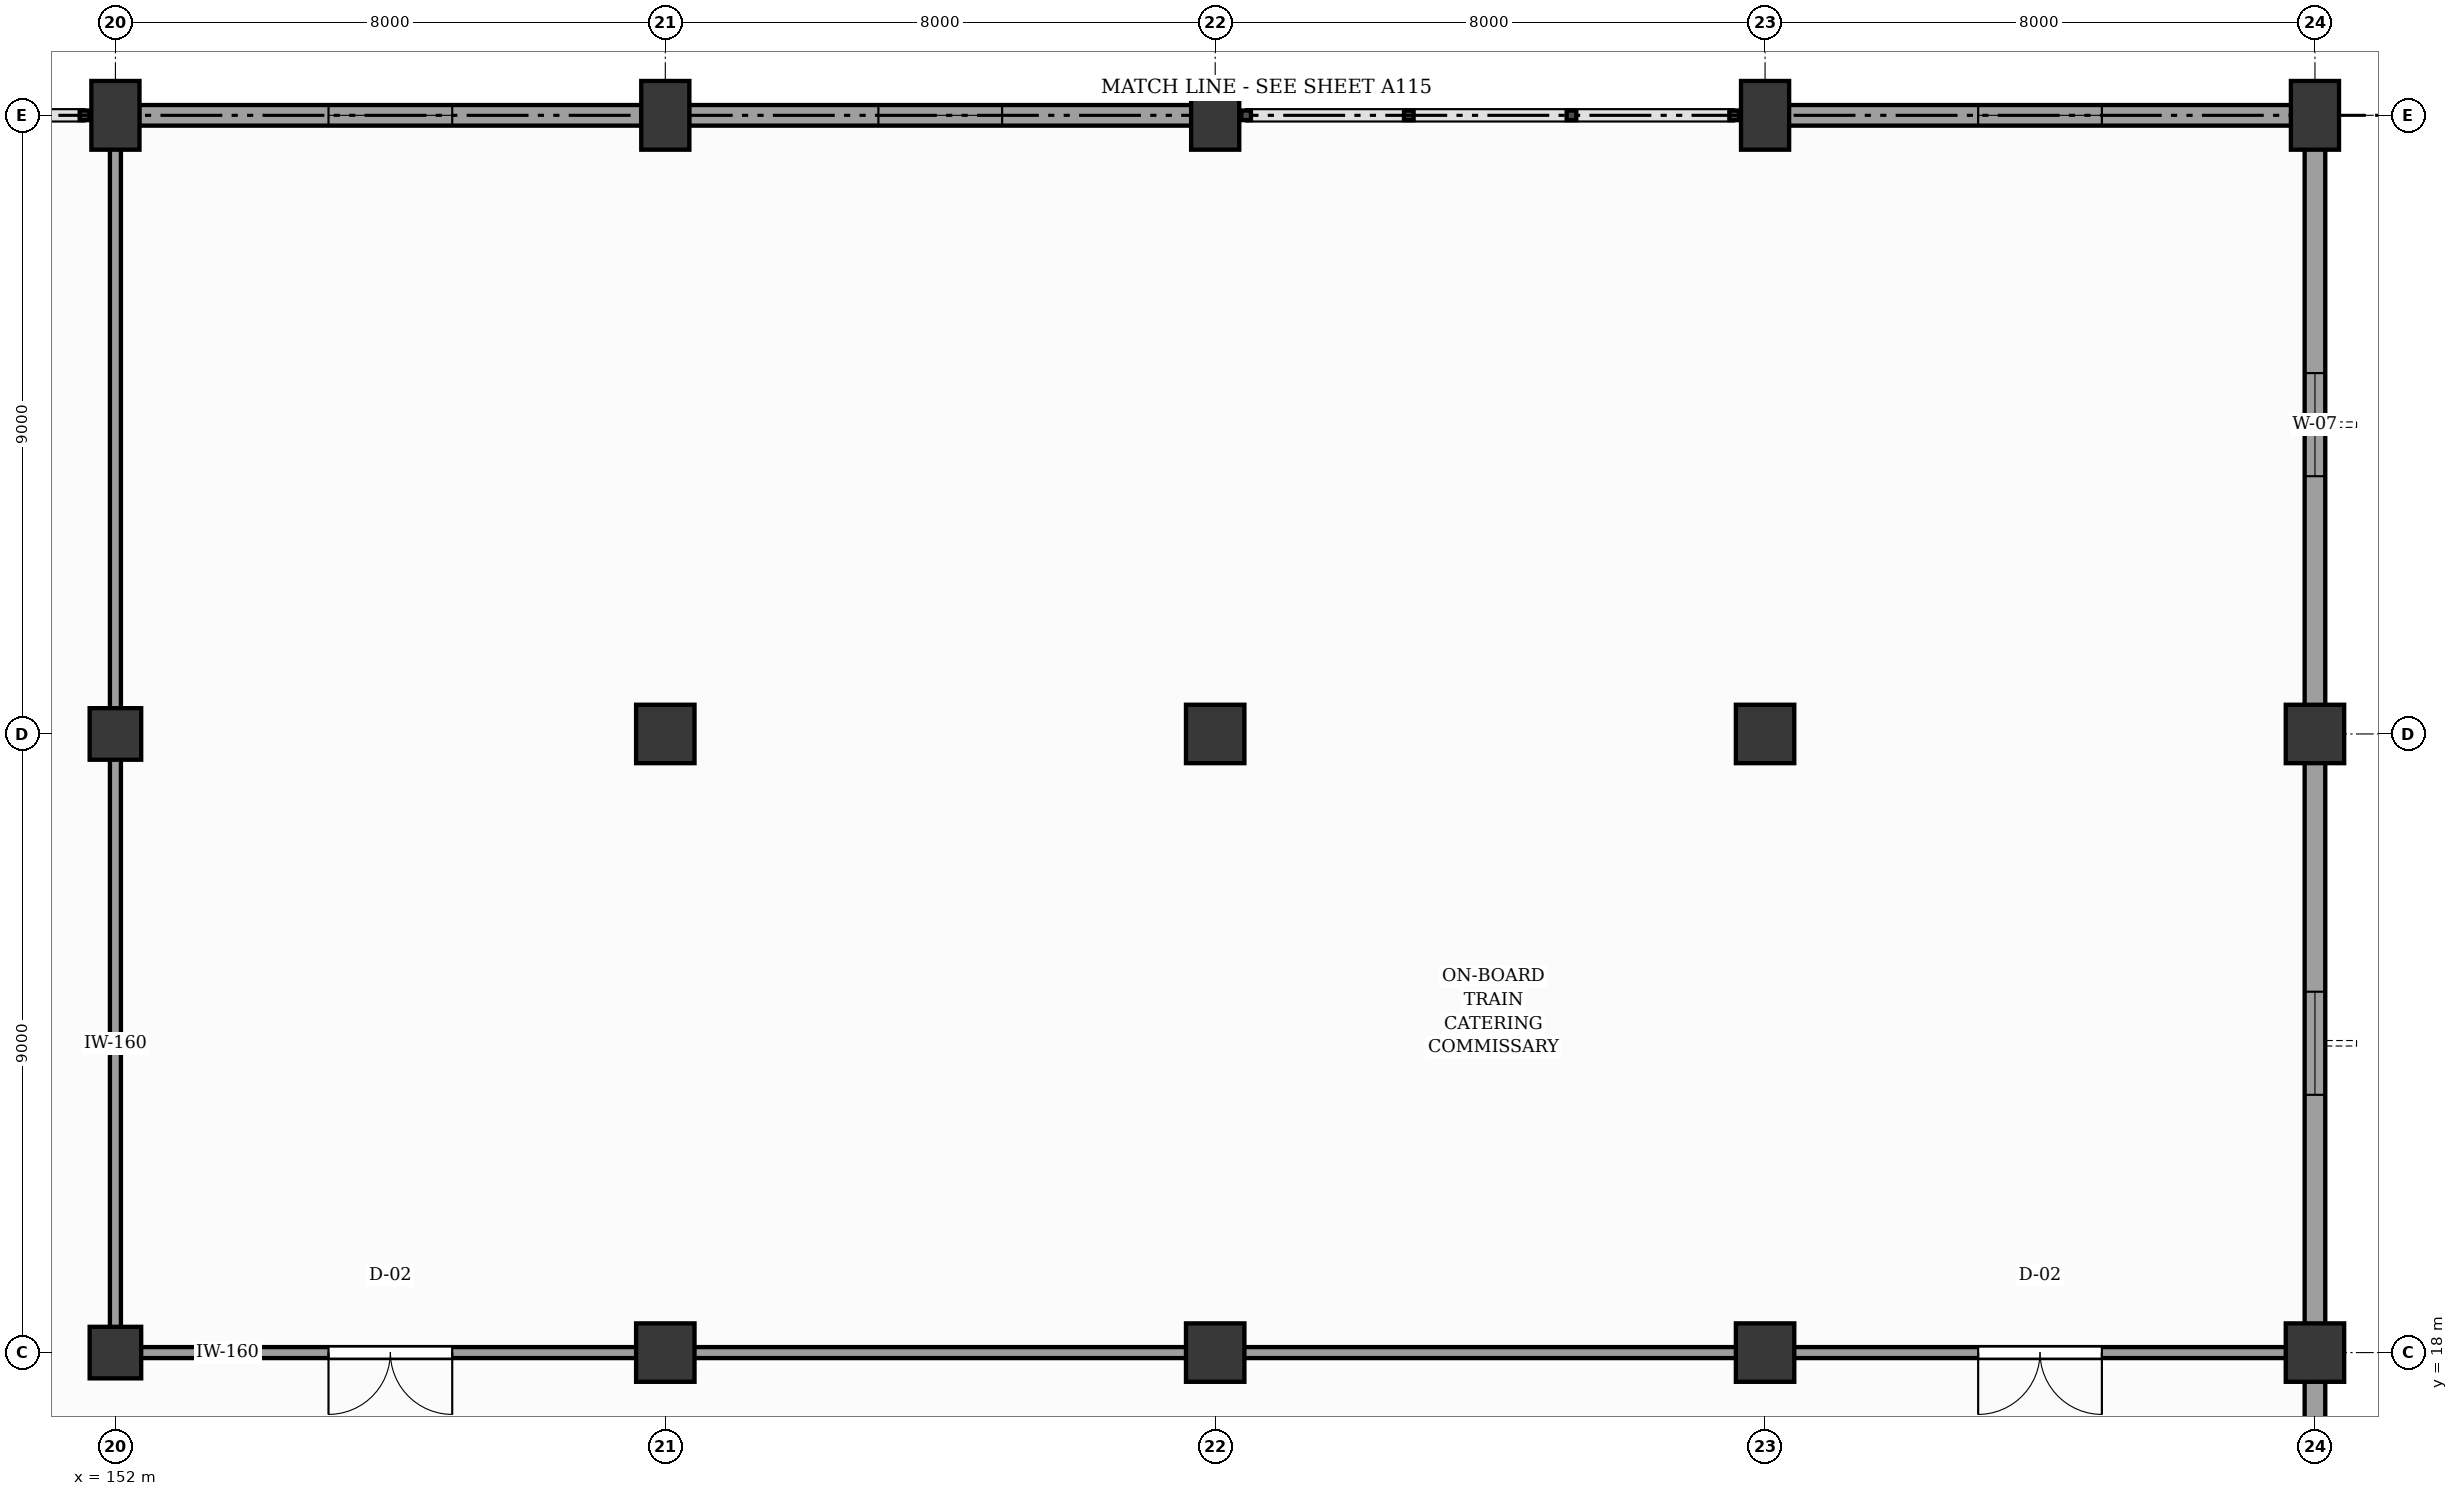
"""IFC4 building model, lengths in metres.
Left out: names, types, materials, properties, quantities, classifications, styles, units other than length and angle.
Written with IfcOpenShell. Run it as: python <this file> out.ifc"""

import sys

from ifc_helpers import new_model, si_unit, direction, frame, frame_2d, origin, origin_2d, place, context, subcontext, project, spatial, rectangle, extrude, element, fill, save


model = new_model("IFC4")
c1 = context("Model", 3, precision=1e-05, world=origin(), true_north=direction((0.0, 1.0)))
c2 = subcontext(c1, "Body", "Model", "MODEL_VIEW")
j1 = project(units=[si_unit("LENGTHUNIT", "METRE"), si_unit("PLANEANGLEUNIT", "RADIAN")], contexts=[c1])
p1 = place(None, origin())
s1 = spatial("IfcSite", under=j1, at=p1, CompositionType="ELEMENT")
p2 = place(p1, origin())
s2 = spatial("IfcBuilding", under=s1, at=p2, CompositionType="ELEMENT")
p3 = place(p2, frame((0.0, 0.0, 4.8)))
s3 = spatial("IfcBuildingStorey", under=s2, at=p3, CompositionType="ELEMENT", Elevation=4.8)
for number, where, z_axis, x_axis in (
    (1, (152.0, 18.0, 0.0), (0.0, 0.0, 1.0), (1.0, 0.0, 0.0)),
    (2, (152.0, 27.0, 0.0), (0.0, 0.0, 1.0), (1.0, 0.0, 0.0)),
):
    element("IfcColumn", number, at=place(p3, frame(where, z_axis=z_axis, x_axis=x_axis)), inside=s3, PredefinedType="COLUMN", context=c2, shape_type="SweptSolid", body=[
        extrude(rectangle(XDim=0.75, YDim=0.75, at=origin_2d()), origin(), (0.0, 0.0, 1.0), 4.8),
    ])
p4 = place(p3, frame((152.0, 36.0, 0.0), z_axis=(0.0, 0.0, 1.0), x_axis=(1.0, 0.0, 0.0)))
e3 = element("IfcColumn", 3, at=p4, inside=s3, PredefinedType="COLUMN", context=c2, shape_type="SweptSolid", body=[
    extrude(rectangle(XDim=0.7, YDim=1.0, at=origin_2d()), origin(), (0.0, 0.0, 1.0), 4.8),
])
for number, where, z_axis, x_axis in (
    (4, (160.0, 18.0, 0.0), (0.0, 0.0, 1.0), (1.0, 0.0, 0.0)),
    (5, (160.0, 27.0, 0.0), (0.0, 0.0, 1.0), (1.0, 0.0, 0.0)),
):
    element("IfcColumn", number, at=place(p3, frame(where, z_axis=z_axis, x_axis=x_axis)), inside=s3, PredefinedType="COLUMN", context=c2, shape_type="SweptSolid", body=[
        extrude(rectangle(XDim=0.85, YDim=0.85, at=origin_2d()), origin(), (0.0, 0.0, 1.0), 4.8),
    ])
p5 = place(p3, frame((160.0, 36.0, 0.0), z_axis=(0.0, 0.0, 1.0), x_axis=(1.0, 0.0, 0.0)))
e6 = element("IfcColumn", 6, at=p5, inside=s3, PredefinedType="COLUMN", context=c2, shape_type="SweptSolid", body=[
    extrude(rectangle(XDim=0.7, YDim=1.0, at=origin_2d()), origin(), (0.0, 0.0, 1.0), 4.8),
])
for number, where, z_axis, x_axis in (
    (7, (168.0, 18.0, 0.0), (0.0, 0.0, 1.0), (1.0, 0.0, 0.0)),
    (8, (168.0, 27.0, 0.0), (0.0, 0.0, 1.0), (1.0, 0.0, 0.0)),
):
    element("IfcColumn", number, at=place(p3, frame(where, z_axis=z_axis, x_axis=x_axis)), inside=s3, PredefinedType="COLUMN", context=c2, shape_type="SweptSolid", body=[
        extrude(rectangle(XDim=0.85, YDim=0.85, at=origin_2d()), origin(), (0.0, 0.0, 1.0), 4.8),
    ])
p6 = place(p3, frame((168.0, 36.0, 0.0), z_axis=(0.0, 0.0, 1.0), x_axis=(1.0, 0.0, 0.0)))
e9 = element("IfcColumn", 9, at=p6, inside=s3, PredefinedType="COLUMN", context=c2, shape_type="SweptSolid", body=[
    extrude(rectangle(XDim=0.7, YDim=1.0, at=origin_2d()), origin(), (0.0, 0.0, 1.0), 4.8),
])
for number, where, z_axis, x_axis in (
    (10, (176.0, 18.0, 0.0), (0.0, 0.0, 1.0), (1.0, 0.0, 0.0)),
    (11, (176.0, 27.0, 0.0), (0.0, 0.0, 1.0), (1.0, 0.0, 0.0)),
):
    element("IfcColumn", number, at=place(p3, frame(where, z_axis=z_axis, x_axis=x_axis)), inside=s3, PredefinedType="COLUMN", context=c2, shape_type="SweptSolid", body=[
        extrude(rectangle(XDim=0.85, YDim=0.85, at=origin_2d()), origin(), (0.0, 0.0, 1.0), 4.8),
    ])
p7 = place(p3, frame((176.0, 36.0, 0.0), z_axis=(0.0, 0.0, 1.0), x_axis=(1.0, 0.0, 0.0)))
e12 = element("IfcColumn", 12, at=p7, inside=s3, PredefinedType="COLUMN", context=c2, shape_type="SweptSolid", body=[
    extrude(rectangle(XDim=0.7, YDim=1.0, at=origin_2d()), origin(), (0.0, 0.0, 1.0), 4.8),
])
for number, where, z_axis, x_axis in (
    (13, (184.0, 18.0, 0.0), (0.0, 0.0, 1.0), (1.0, 0.0, 0.0)),
    (14, (184.0, 27.0, 0.0), (0.0, 0.0, 1.0), (1.0, 0.0, 0.0)),
):
    element("IfcColumn", number, at=place(p3, frame(where, z_axis=z_axis, x_axis=x_axis)), inside=s3, PredefinedType="COLUMN", context=c2, shape_type="SweptSolid", body=[
        extrude(rectangle(XDim=0.85, YDim=0.85, at=origin_2d()), origin(), (0.0, 0.0, 1.0), 4.8),
    ])
p8 = place(p3, frame((184.0, 36.0, 0.0), z_axis=(0.0, 0.0, 1.0), x_axis=(1.0, 0.0, 0.0)))
e15 = element("IfcColumn", 15, at=p8, inside=s3, PredefinedType="COLUMN", context=c2, shape_type="SweptSolid", body=[
    extrude(rectangle(XDim=0.7, YDim=1.0, at=origin_2d()), origin(), (0.0, 0.0, 1.0), 4.8),
])
p9 = place(p3, frame((152.345, 36.0, 0.0), z_axis=(0.0, 0.0, 1.0), x_axis=(1.0, 0.0, 0.0)))
e16 = element("IfcWall", 16, at=p9, inside=s3, PredefinedType="SOLIDWALL", context=c2, shape_type="SweptSolid", body=[
    extrude(rectangle(XDim=7.31, YDim=0.3, at=frame_2d((3.655, 0.0))), origin(), (0.0, 0.0, 1.0), 3.31),
])
p10 = place(p9, frame((2.755, 0.0, 0.95)))
e17 = element("IfcOpeningElement", 17, at=p10, cuts=e16, PredefinedType="OPENING", context=c2, shape_type="SweptSolid", body=[
    extrude(rectangle(XDim=1.8, YDim=2.22, at=frame_2d((0.9, 1.11))), frame((0.0, 0.16, 0.0), z_axis=(0.0, -1.0, 0.0), x_axis=(1.0, 0.0, 0.0)), (0.0, 0.0, 1.0), 0.32),
])
p11 = place(p3, frame((160.345, 36.0, 0.0), z_axis=(0.0, 0.0, 1.0), x_axis=(1.0, 0.0, 0.0)))
e18 = element("IfcWall", 18, at=p11, inside=s3, PredefinedType="SOLIDWALL", context=c2, shape_type="SweptSolid", body=[
    extrude(rectangle(XDim=7.31, YDim=0.3, at=frame_2d((3.655, 0.0))), origin(), (0.0, 0.0, 1.0), 3.31),
])
p12 = place(p11, frame((2.755, 0.0, 0.95)))
e19 = element("IfcOpeningElement", 19, at=p12, cuts=e18, PredefinedType="OPENING", context=c2, shape_type="SweptSolid", body=[
    extrude(rectangle(XDim=1.8, YDim=2.22, at=frame_2d((0.9, 1.11))), frame((0.0, 0.16, 0.0), z_axis=(0.0, -1.0, 0.0), x_axis=(1.0, 0.0, 0.0)), (0.0, 0.0, 1.0), 0.32),
])
p13 = place(p3, frame((176.345, 36.0, 0.0), z_axis=(0.0, 0.0, 1.0), x_axis=(1.0, 0.0, 0.0)))
e20 = element("IfcWall", 20, at=p13, inside=s3, PredefinedType="SOLIDWALL", context=c2, shape_type="SweptSolid", body=[
    extrude(rectangle(XDim=7.31, YDim=0.3, at=frame_2d((3.655, 0.0))), origin(), (0.0, 0.0, 1.0), 3.31),
])
p14 = place(p13, frame((2.755, 0.0, 0.95)))
e21 = element("IfcOpeningElement", 21, at=p14, cuts=e20, PredefinedType="OPENING", context=c2, shape_type="SweptSolid", body=[
    extrude(rectangle(XDim=1.8, YDim=2.22, at=frame_2d((0.9, 1.11))), frame((0.0, 0.16, 0.0), z_axis=(0.0, -1.0, 0.0), x_axis=(1.0, 0.0, 0.0)), (0.0, 0.0, 1.0), 0.32),
])
p15 = place(p3, frame((184.0, 9.4, 0.0), z_axis=(0.0, 0.0, 1.0), x_axis=(0.0, 1.0, 0.0)))
e22 = element("IfcWall", 22, at=p15, inside=s3, PredefinedType="SOLIDWALL", context=c2, shape_type="SweptSolid", body=[
    extrude(rectangle(XDim=8.2, YDim=0.3, at=frame_2d((4.1, 0.0))), origin(), (0.0, 0.0, 1.0), 3.66),
])
p16 = place(p15, frame((3.35, 0.0, 0.95)))
e23 = element("IfcOpeningElement", 23, at=p16, cuts=e22, PredefinedType="OPENING", context=c2, shape_type="SweptSolid", body=[
    extrude(rectangle(XDim=1.5, YDim=1.9, at=frame_2d((0.75, 0.95))), frame((0.0, 0.16, 0.0), z_axis=(0.0, -1.0, 0.0), x_axis=(1.0, 0.0, 0.0)), (0.0, 0.0, 1.0), 0.32),
])
p17 = place(p3, frame((184.0, 18.4, 0.0), z_axis=(0.0, 0.0, 1.0), x_axis=(0.0, 1.0, 0.0)))
e24 = element("IfcWall", 24, at=p17, inside=s3, PredefinedType="SOLIDWALL", context=c2, shape_type="SweptSolid", body=[
    extrude(rectangle(XDim=8.2, YDim=0.3, at=frame_2d((4.1, 0.0))), origin(), (0.0, 0.0, 1.0), 3.66),
])
p18 = place(p17, frame((3.35, 0.0, 0.95)))
e25 = element("IfcOpeningElement", 25, at=p18, cuts=e24, PredefinedType="OPENING", context=c2, shape_type="SweptSolid", body=[
    extrude(rectangle(XDim=1.5, YDim=1.9, at=frame_2d((0.75, 0.95))), frame((0.0, 0.16, 0.0), z_axis=(0.0, -1.0, 0.0), x_axis=(1.0, 0.0, 0.0)), (0.0, 0.0, 1.0), 0.32),
])
p19 = place(p3, frame((184.0, 27.4, 0.0), z_axis=(0.0, 0.0, 1.0), x_axis=(0.0, 1.0, 0.0)))
e26 = element("IfcWall", 26, at=p19, inside=s3, PredefinedType="SOLIDWALL", context=c2, shape_type="SweptSolid", body=[
    extrude(rectangle(XDim=8.2, YDim=0.3, at=frame_2d((4.1, 0.0))), origin(), (0.0, 0.0, 1.0), 3.31),
])
p20 = place(p19, frame((3.35, 0.0, 0.95)))
e27 = element("IfcOpeningElement", 27, at=p20, cuts=e26, PredefinedType="OPENING", context=c2, shape_type="SweptSolid", body=[
    extrude(rectangle(XDim=1.5, YDim=1.9, at=frame_2d((0.75, 0.95))), frame((0.0, 0.16, 0.0), z_axis=(0.0, -1.0, 0.0), x_axis=(1.0, 0.0, 0.0)), (0.0, 0.0, 1.0), 0.32),
])
p21 = place(p3, frame((152.3, 18.0, 0.0), z_axis=(0.0, 0.0, 1.0), x_axis=(1.0, 0.0, 0.0)))
e28 = element("IfcWall", 28, at=p21, inside=s3, PredefinedType="PARTITIONING", context=c2, shape_type="SweptSolid", body=[
    extrude(rectangle(XDim=7.4, YDim=0.16, at=frame_2d((3.7, 0.0))), origin(), (0.0, 0.0, 1.0), 3.66),
])
p22 = place(p21, frame((2.8, 0.0, 0.0)))
e29 = element("IfcOpeningElement", 29, at=p22, cuts=e28, PredefinedType="OPENING", context=c2, shape_type="SweptSolid", body=[
    extrude(rectangle(XDim=1.8, YDim=2.25, at=frame_2d((0.9, 1.125))), frame((0.0, 0.09, 0.0), z_axis=(0.0, -1.0, 0.0), x_axis=(1.0, 0.0, 0.0)), (0.0, 0.0, 1.0), 0.18),
])
for number, where, z_axis, x_axis in (
    (30, (160.3, 18.0, 0.0), (0.0, 0.0, 1.0), (1.0, 0.0, 0.0)),
    (31, (168.3, 18.0, 0.0), (0.0, 0.0, 1.0), (1.0, 0.0, 0.0)),
):
    element("IfcWall", number, at=place(p3, frame(where, z_axis=z_axis, x_axis=x_axis)), inside=s3, PredefinedType="PARTITIONING", context=c2, shape_type="SweptSolid", body=[
        extrude(rectangle(XDim=7.4, YDim=0.16, at=frame_2d((3.7, 0.0))), origin(), (0.0, 0.0, 1.0), 3.66),
    ])
p23 = place(p3, frame((176.3, 18.0, 0.0), z_axis=(0.0, 0.0, 1.0), x_axis=(1.0, 0.0, 0.0)))
e32 = element("IfcWall", 32, at=p23, inside=s3, PredefinedType="PARTITIONING", context=c2, shape_type="SweptSolid", body=[
    extrude(rectangle(XDim=7.4, YDim=0.16, at=frame_2d((3.7, 0.0))), origin(), (0.0, 0.0, 1.0), 3.66),
])
p24 = place(p23, frame((2.8, 0.0, 0.0)))
e33 = element("IfcOpeningElement", 33, at=p24, cuts=e32, PredefinedType="OPENING", context=c2, shape_type="SweptSolid", body=[
    extrude(rectangle(XDim=1.8, YDim=2.25, at=frame_2d((0.9, 1.125))), frame((0.0, 0.09, 0.0), z_axis=(0.0, -1.0, 0.0), x_axis=(1.0, 0.0, 0.0)), (0.0, 0.0, 1.0), 0.18),
])
p25 = place(p3, frame((152.0, 18.3, 0.0), z_axis=(0.0, 0.0, 1.0), x_axis=(0.0, 1.0, 0.0)))
e34 = element("IfcWall", 34, at=p25, inside=s3, PredefinedType="PARTITIONING", context=c2, shape_type="SweptSolid", body=[
    extrude(rectangle(XDim=8.4, YDim=0.16, at=frame_2d((4.2, 0.0))), origin(), (0.0, 0.0, 1.0), 3.66),
])
p26 = place(p3, frame((152.0, 27.3, 0.0), z_axis=(0.0, 0.0, 1.0), x_axis=(0.0, 1.0, 0.0)))
e35 = element("IfcWall", 35, at=p26, inside=s3, PredefinedType="PARTITIONING", context=c2, shape_type="SweptSolid", body=[
    extrude(rectangle(XDim=8.4, YDim=0.16, at=frame_2d((4.2, 0.0))), origin(), (0.0, 0.0, 1.0), 3.31),
])
p27 = place(p10, origin())
e36 = element("IfcWindow", 36, at=p27, inside=s3, PartitioningType="SINGLE_PANEL", PredefinedType="WINDOW", context=c2, shape_type="SweptSolid", body=[
    extrude(rectangle(XDim=1.8, YDim=2.22, at=frame_2d((0.9, 1.11))), frame((0.0, 0.03, 0.0), z_axis=(0.0, -1.0, 0.0), x_axis=(1.0, 0.0, 0.0)), (0.0, 0.0, 1.0), 0.06),
])
fill(e17, e36)
p28 = place(p12, origin())
e37 = element("IfcWindow", 37, at=p28, inside=s3, PartitioningType="SINGLE_PANEL", PredefinedType="WINDOW", context=c2, shape_type="SweptSolid", body=[
    extrude(rectangle(XDim=1.8, YDim=2.22, at=frame_2d((0.9, 1.11))), frame((0.0, 0.03, 0.0), z_axis=(0.0, -1.0, 0.0), x_axis=(1.0, 0.0, 0.0)), (0.0, 0.0, 1.0), 0.06),
])
fill(e19, e37)
p29 = place(p14, origin())
e38 = element("IfcWindow", 38, at=p29, inside=s3, PartitioningType="SINGLE_PANEL", PredefinedType="WINDOW", context=c2, shape_type="SweptSolid", body=[
    extrude(rectangle(XDim=1.8, YDim=2.22, at=frame_2d((0.9, 1.11))), frame((0.0, 0.03, 0.0), z_axis=(0.0, -1.0, 0.0), x_axis=(1.0, 0.0, 0.0)), (0.0, 0.0, 1.0), 0.06),
])
fill(e21, e38)
p30 = place(p18, origin())
e39 = element("IfcWindow", 39, at=p30, inside=s3, PartitioningType="SINGLE_PANEL", PredefinedType="WINDOW", context=c2, shape_type="SweptSolid", body=[
    extrude(rectangle(XDim=1.5, YDim=1.9, at=frame_2d((0.75, 0.95))), frame((0.0, 0.03, 0.0), z_axis=(0.0, -1.0, 0.0), x_axis=(1.0, 0.0, 0.0)), (0.0, 0.0, 1.0), 0.06),
])
fill(e25, e39)
p31 = place(p20, origin())
e40 = element("IfcWindow", 40, at=p31, inside=s3, PartitioningType="SINGLE_PANEL", PredefinedType="WINDOW", context=c2, shape_type="SweptSolid", body=[
    extrude(rectangle(XDim=1.5, YDim=1.9, at=frame_2d((0.75, 0.95))), frame((0.0, 0.03, 0.0), z_axis=(0.0, -1.0, 0.0), x_axis=(1.0, 0.0, 0.0)), (0.0, 0.0, 1.0), 0.06),
])
fill(e27, e40)
p32 = place(p22, frame((1.8, 0.0, 0.0), z_axis=(0.0, 0.0, 1.0), x_axis=(-1.0, 0.0, 0.0)))
e41 = element("IfcDoor", 41, at=p32, inside=s3, OperationType="DOUBLE_DOOR_SINGLE_SWING", PredefinedType="DOOR", context=c2, shape_type="SweptSolid", body=[
    extrude(rectangle(XDim=1.8, YDim=2.25, at=frame_2d((0.9, 1.125))), frame((0.0, 0.025, 0.0), z_axis=(0.0, -1.0, 0.0), x_axis=(1.0, 0.0, 0.0)), (0.0, 0.0, 1.0), 0.05),
])
fill(e29, e41)
p33 = place(p24, frame((1.8, 0.0, 0.0), z_axis=(0.0, 0.0, 1.0), x_axis=(-1.0, 0.0, 0.0)))
e42 = element("IfcDoor", 42, at=p33, inside=s3, OperationType="DOUBLE_DOOR_SINGLE_SWING", PredefinedType="DOOR", context=c2, shape_type="SweptSolid", body=[
    extrude(rectangle(XDim=1.8, YDim=2.25, at=frame_2d((0.9, 1.125))), frame((0.0, 0.025, 0.0), z_axis=(0.0, -1.0, 0.0), x_axis=(1.0, 0.0, 0.0)), (0.0, 0.0, 1.0), 0.05),
])
fill(e33, e42)
save(model, sys.argv[1])
